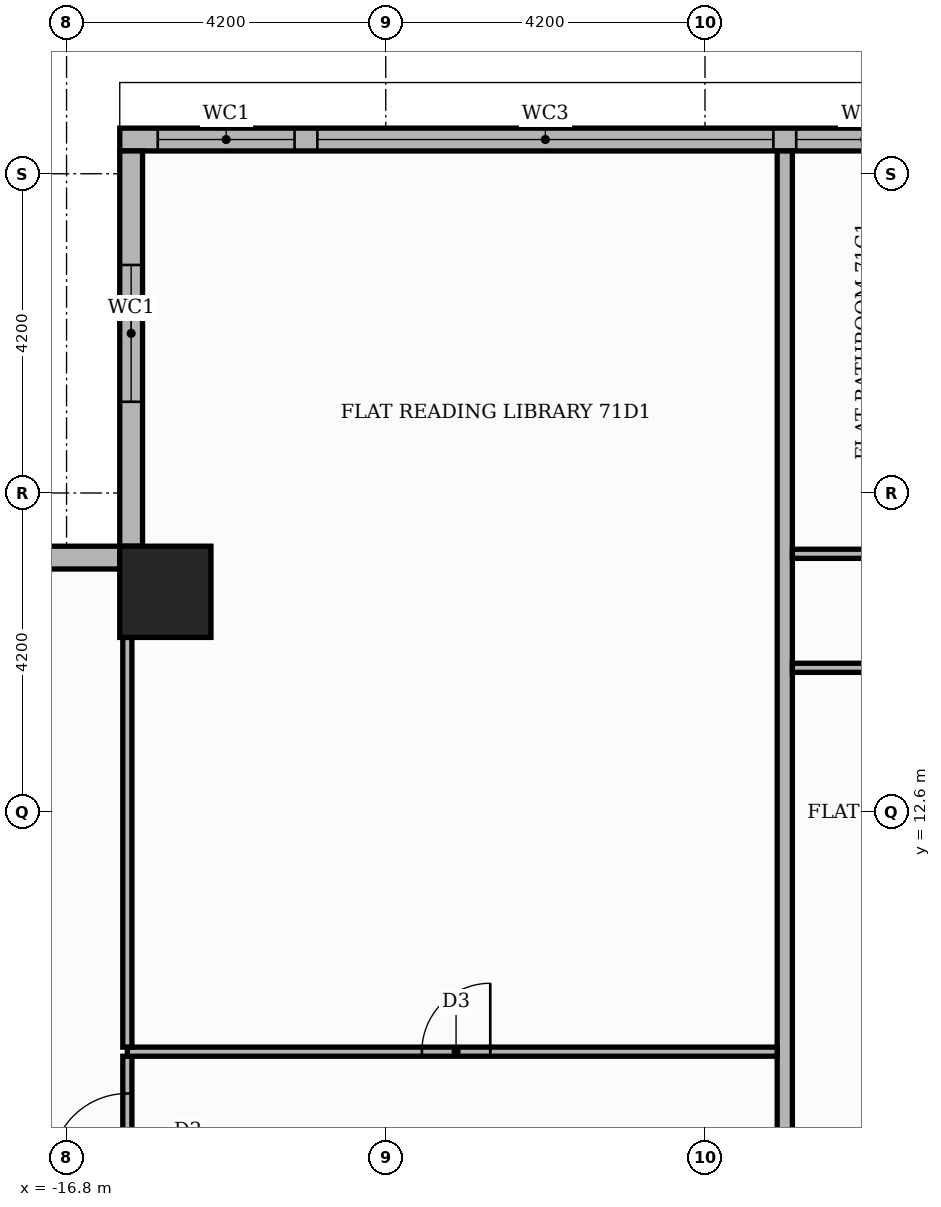
"""IFC4 building model, lengths in metres.
Left out: names, types, materials, properties, quantities, classifications, styles, units other than length and angle.
Written with IfcOpenShell. Run it as: python <this file> out.ifc"""

import sys

from ifc_helpers import new_model, si_unit, direction, frame, frame_2d, origin, origin_2d, place, context, subcontext, project, spatial, rectangle, extrude, element, fill, save


model = new_model("IFC4")
c1 = context("Model", 3, precision=1e-05, world=origin(), true_north=direction((0.0, 1.0)))
c2 = subcontext(c1, "Body", "Model", "MODEL_VIEW")
j1 = project(units=[si_unit("LENGTHUNIT", "METRE"), si_unit("PLANEANGLEUNIT", "RADIAN")], contexts=[c1])
p1 = place(None, origin())
s1 = spatial("IfcSite", under=j1, at=p1, CompositionType="ELEMENT")
p2 = place(p1, origin())
s2 = spatial("IfcBuilding", under=s1, at=p2, CompositionType="ELEMENT")
p3 = place(p2, frame((0.0, 0.0, 296.7)))
s3 = spatial("IfcBuildingStorey", under=s2, at=p3, CompositionType="ELEMENT", Elevation=296.7)
p4 = place(p3, frame((-15.5, 15.5, 0.0), z_axis=(0.0, 0.0, 1.0), x_axis=(1.0, 0.0, 0.0)))
e1 = element("IfcColumn", 1, at=p4, inside=s3, PredefinedType="COLUMN", context=c2, shape_type="SweptSolid", body=[
    extrude(rectangle(XDim=1.2, YDim=1.2, at=origin_2d()), origin(), (0.0, 0.0, 1.0), 3.9),
])
p5 = place(p3, frame((15.8, 21.45, 0.0), z_axis=(0.0, 0.0, 1.0), x_axis=(-1.0, 0.0, 0.0)))
e2 = element("IfcWall", 2, at=p5, inside=s3, PredefinedType="STANDARD", context=c2, shape_type="SweptSolid", body=[
    extrude(rectangle(XDim=31.9, YDim=0.3, at=frame_2d((15.95, 0.0))), origin(), (0.0, 0.0, 1.0), 3.55),
])
p6 = place(p5, frame((0.2, 0.0, 0.6)))
e3 = element("IfcOpeningElement", 3, at=p6, cuts=e2, PredefinedType="OPENING", context=c2, shape_type="SweptSolid", body=[
    extrude(rectangle(XDim=6.0, YDim=2.4, at=frame_2d((3.0, 1.2))), frame((0.0, 0.16, 0.0), z_axis=(0.0, -1.0, 0.0), x_axis=(1.0, 0.0, 0.0)), (0.0, 0.0, 1.0), 0.32),
])
p7 = place(p5, frame((6.5, 0.0, 0.6)))
e4 = element("IfcOpeningElement", 4, at=p7, cuts=e2, PredefinedType="OPENING", context=c2, shape_type="SweptSolid", body=[
    extrude(rectangle(XDim=3.9, YDim=2.4, at=frame_2d((1.95, 1.2))), frame((0.0, 0.16, 0.0), z_axis=(0.0, -1.0, 0.0), x_axis=(1.0, 0.0, 0.0)), (0.0, 0.0, 1.0), 0.32),
])
p8 = place(p5, frame((10.7, 0.0, 0.6)))
e5 = element("IfcOpeningElement", 5, at=p8, cuts=e2, PredefinedType="OPENING", context=c2, shape_type="SweptSolid", body=[
    extrude(rectangle(XDim=6.0, YDim=2.4, at=frame_2d((3.0, 1.2))), frame((0.0, 0.16, 0.0), z_axis=(0.0, -1.0, 0.0), x_axis=(1.0, 0.0, 0.0)), (0.0, 0.0, 1.0), 0.32),
])
p9 = place(p5, frame((17.0, 0.0, 0.6)))
e6 = element("IfcOpeningElement", 6, at=p9, cuts=e2, PredefinedType="OPENING", context=c2, shape_type="SweptSolid", body=[
    extrude(rectangle(XDim=1.8, YDim=2.4, at=frame_2d((0.9, 1.2))), frame((0.0, 0.16, 0.0), z_axis=(0.0, -1.0, 0.0), x_axis=(1.0, 0.0, 0.0)), (0.0, 0.0, 1.0), 0.32),
])
p10 = place(p5, frame((19.1, 0.0, 0.6)))
e7 = element("IfcOpeningElement", 7, at=p10, cuts=e2, PredefinedType="OPENING", context=c2, shape_type="SweptSolid", body=[
    extrude(rectangle(XDim=1.8, YDim=2.4, at=frame_2d((0.9, 1.2))), frame((0.0, 0.16, 0.0), z_axis=(0.0, -1.0, 0.0), x_axis=(1.0, 0.0, 0.0)), (0.0, 0.0, 1.0), 0.32),
])
p11 = place(p5, frame((21.2, 0.0, 0.6)))
e8 = element("IfcOpeningElement", 8, at=p11, cuts=e2, PredefinedType="OPENING", context=c2, shape_type="SweptSolid", body=[
    extrude(rectangle(XDim=1.8, YDim=2.4, at=frame_2d((0.9, 1.2))), frame((0.0, 0.16, 0.0), z_axis=(0.0, -1.0, 0.0), x_axis=(1.0, 0.0, 0.0)), (0.0, 0.0, 1.0), 0.32),
])
p12 = place(p5, frame((23.3, 0.0, 0.6)))
e9 = element("IfcOpeningElement", 9, at=p12, cuts=e2, PredefinedType="OPENING", context=c2, shape_type="SweptSolid", body=[
    extrude(rectangle(XDim=6.0, YDim=2.4, at=frame_2d((3.0, 1.2))), frame((0.0, 0.16, 0.0), z_axis=(0.0, -1.0, 0.0), x_axis=(1.0, 0.0, 0.0)), (0.0, 0.0, 1.0), 0.32),
])
p13 = place(p5, frame((29.6, 0.0, 0.6)))
e10 = element("IfcOpeningElement", 10, at=p13, cuts=e2, PredefinedType="OPENING", context=c2, shape_type="SweptSolid", body=[
    extrude(rectangle(XDim=1.8, YDim=2.4, at=frame_2d((0.9, 1.2))), frame((0.0, 0.16, 0.0), z_axis=(0.0, -1.0, 0.0), x_axis=(1.0, 0.0, 0.0)), (0.0, 0.0, 1.0), 0.32),
])
p14 = place(p3, frame((-15.95, 21.3, 0.0), z_axis=(0.0, 0.0, 1.0), x_axis=(0.0, -1.0, 0.0)))
e11 = element("IfcWall", 11, at=p14, inside=s3, PredefinedType="STANDARD", context=c2, shape_type="SweptSolid", body=[
    extrude(rectangle(XDim=5.2, YDim=0.3, at=frame_2d((2.6, 0.0))), origin(), (0.0, 0.0, 1.0), 3.55),
])
p15 = place(p14, frame((1.5, 0.0, 0.6)))
e12 = element("IfcOpeningElement", 12, at=p15, cuts=e11, PredefinedType="OPENING", context=c2, shape_type="SweptSolid", body=[
    extrude(rectangle(XDim=1.8, YDim=2.4, at=frame_2d((0.9, 1.2))), frame((0.0, 0.16, 0.0), z_axis=(0.0, -1.0, 0.0), x_axis=(1.0, 0.0, 0.0)), (0.0, 0.0, 1.0), 0.32),
])
p16 = place(p3, frame((-16.1, 15.95, 0.0), z_axis=(0.0, 0.0, 1.0), x_axis=(-1.0, 0.0, 0.0)))
e13 = element("IfcWall", 13, at=p16, inside=s3, PredefinedType="STANDARD", context=c2, shape_type="SweptSolid", body=[
    extrude(rectangle(XDim=5.5, YDim=0.3, at=frame_2d((2.75, 0.0))), origin(), (0.0, 0.0, 1.0), 3.55),
])
p17 = place(p16, frame((1.9, 0.0, 0.6)))
e14 = element("IfcOpeningElement", 14, at=p17, cuts=e13, PredefinedType="OPENING", context=c2, shape_type="SweptSolid", body=[
    extrude(rectangle(XDim=1.8, YDim=2.4, at=frame_2d((0.9, 1.2))), frame((0.0, 0.16, 0.0), z_axis=(0.0, -1.0, 0.0), x_axis=(1.0, 0.0, 0.0)), (0.0, 0.0, 1.0), 0.32),
])
p18 = place(p3, frame((-16.0, 7.41, 0.0), z_axis=(0.0, 0.0, 1.0), x_axis=(0.0, 1.0, 0.0)))
e15 = element("IfcWall", 15, at=p18, inside=s3, PredefinedType="PARTITIONING", context=c2, shape_type="SweptSolid", body=[
    extrude(rectangle(XDim=1.98, YDim=0.12, at=frame_2d((0.99, 0.0))), origin(), (0.0, 0.0, 1.0), 3.55),
])
p19 = place(p18, frame((0.49, 0.0, 0.0)))
e16 = element("IfcOpeningElement", 16, at=p19, cuts=e15, PredefinedType="OPENING", context=c2, shape_type="SweptSolid", body=[
    extrude(rectangle(XDim=1.0, YDim=2.1, at=frame_2d((0.5, 1.05))), frame((0.0, 0.07, 0.0), z_axis=(0.0, -1.0, 0.0), x_axis=(1.0, 0.0, 0.0)), (0.0, 0.0, 1.0), 0.14),
])
p20 = place(p3, frame((-7.35, 7.45, 0.0), z_axis=(0.0, 0.0, 1.0), x_axis=(0.0, 1.0, 0.0)))
e17 = element("IfcWall", 17, at=p20, inside=s3, PredefinedType="PARTITIONING", context=c2, shape_type="SweptSolid", body=[
    extrude(rectangle(XDim=13.85, YDim=0.2, at=frame_2d((6.925, 0.0))), origin(), (0.0, 0.0, 1.0), 3.55),
])
p21 = place(p3, frame((-16.0, 9.45, 0.0), z_axis=(0.0, 0.0, 1.0), x_axis=(1.0, 0.0, 0.0)))
e18 = element("IfcWall", 18, at=p21, inside=s3, PredefinedType="PARTITIONING", context=c2, shape_type="SweptSolid", body=[
    extrude(rectangle(XDim=8.55, YDim=0.12, at=frame_2d((4.275, 0.0))), origin(), (0.0, 0.0, 1.0), 3.55),
])
p22 = place(p21, frame((3.875, 0.0, 0.0)))
e19 = element("IfcOpeningElement", 19, at=p22, cuts=e18, PredefinedType="OPENING", context=c2, shape_type="SweptSolid", body=[
    extrude(rectangle(XDim=0.9, YDim=2.1, at=frame_2d((0.45, 1.05))), frame((0.0, 0.07, 0.0), z_axis=(0.0, -1.0, 0.0), x_axis=(1.0, 0.0, 0.0)), (0.0, 0.0, 1.0), 0.14),
])
p23 = place(p3, frame((-16.0, 9.51, 0.0), z_axis=(0.0, 0.0, 1.0), x_axis=(0.0, 1.0, 0.0)))
e20 = element("IfcWall", 20, at=p23, inside=s3, PredefinedType="PARTITIONING", context=c2, shape_type="SweptSolid", body=[
    extrude(rectangle(XDim=5.39, YDim=0.12, at=frame_2d((2.695, 0.0))), origin(), (0.0, 0.0, 1.0), 3.55),
])
p24 = place(p3, frame((-7.25, 14.5, 0.0), z_axis=(0.0, 0.0, 1.0), x_axis=(1.0, 0.0, 0.0)))
e21 = element("IfcWall", 21, at=p24, inside=s3, PredefinedType="PARTITIONING", context=c2, shape_type="SweptSolid", body=[
    extrude(rectangle(XDim=8.3, YDim=0.12, at=frame_2d((4.15, 0.0))), origin(), (0.0, 0.0, 1.0), 3.55),
])
p25 = place(p24, frame((4.475, 0.0, 0.0)))
e22 = element("IfcOpeningElement", 22, at=p25, cuts=e21, PredefinedType="OPENING", context=c2, shape_type="SweptSolid", body=[
    extrude(rectangle(XDim=0.9, YDim=2.1, at=frame_2d((0.45, 1.05))), frame((0.0, 0.07, 0.0), z_axis=(0.0, -1.0, 0.0), x_axis=(1.0, 0.0, 0.0)), (0.0, 0.0, 1.0), 0.14),
])
p26 = place(p24, frame((1.325, 0.0, 0.0)))
e23 = element("IfcOpeningElement", 23, at=p26, cuts=e21, PredefinedType="OPENING", context=c2, shape_type="SweptSolid", body=[
    extrude(rectangle(XDim=0.9, YDim=2.1, at=frame_2d((0.45, 1.05))), frame((0.0, 0.07, 0.0), z_axis=(0.0, -1.0, 0.0), x_axis=(1.0, 0.0, 0.0)), (0.0, 0.0, 1.0), 0.14),
])
p27 = place(p3, frame((-7.25, 16.0, 0.0), z_axis=(0.0, 0.0, 1.0), x_axis=(1.0, 0.0, 0.0)))
e24 = element("IfcWall", 24, at=p27, inside=s3, PredefinedType="PARTITIONING", context=c2, shape_type="SweptSolid", body=[
    extrude(rectangle(XDim=22.15, YDim=0.12, at=frame_2d((11.075, 0.0))), origin(), (0.0, 0.0, 1.0), 3.55),
])
p28 = place(p27, frame((13.05, 0.0, 0.0)))
e25 = element("IfcOpeningElement", 25, at=p28, cuts=e24, PredefinedType="OPENING", context=c2, shape_type="SweptSolid", body=[
    extrude(rectangle(XDim=1.0, YDim=2.1, at=frame_2d((0.5, 1.05))), frame((0.0, 0.07, 0.0), z_axis=(0.0, -1.0, 0.0), x_axis=(1.0, 0.0, 0.0)), (0.0, 0.0, 1.0), 0.14),
])
p29 = place(p27, frame((7.85, 0.0, 0.0)))
e26 = element("IfcOpeningElement", 26, at=p29, cuts=e24, PredefinedType="OPENING", context=c2, shape_type="SweptSolid", body=[
    extrude(rectangle(XDim=0.9, YDim=2.1, at=frame_2d((0.45, 1.05))), frame((0.0, 0.07, 0.0), z_axis=(0.0, -1.0, 0.0), x_axis=(1.0, 0.0, 0.0)), (0.0, 0.0, 1.0), 0.14),
])
p30 = place(p11, origin())
e27 = element("IfcWindow", 27, at=p30, inside=s3, PartitioningType="SINGLE_PANEL", PredefinedType="WINDOW", context=c2, shape_type="SweptSolid", body=[
    extrude(rectangle(XDim=1.8, YDim=2.4, at=frame_2d((0.9, 1.2))), frame((0.0, 0.03, 0.0), z_axis=(0.0, -1.0, 0.0), x_axis=(1.0, 0.0, 0.0)), (0.0, 0.0, 1.0), 0.06),
])
fill(e8, e27)
p31 = place(p12, origin())
e28 = element("IfcWindow", 28, at=p31, inside=s3, PartitioningType="SINGLE_PANEL", PredefinedType="WINDOW", context=c2, shape_type="SweptSolid", body=[
    extrude(rectangle(XDim=6.0, YDim=2.4, at=frame_2d((3.0, 1.2))), frame((0.0, 0.03, 0.0), z_axis=(0.0, -1.0, 0.0), x_axis=(1.0, 0.0, 0.0)), (0.0, 0.0, 1.0), 0.06),
])
fill(e9, e28)
p32 = place(p13, origin())
e29 = element("IfcWindow", 29, at=p32, inside=s3, PartitioningType="SINGLE_PANEL", PredefinedType="WINDOW", context=c2, shape_type="SweptSolid", body=[
    extrude(rectangle(XDim=1.8, YDim=2.4, at=frame_2d((0.9, 1.2))), frame((0.0, 0.03, 0.0), z_axis=(0.0, -1.0, 0.0), x_axis=(1.0, 0.0, 0.0)), (0.0, 0.0, 1.0), 0.06),
])
fill(e10, e29)
p33 = place(p15, origin())
e30 = element("IfcWindow", 30, at=p33, inside=s3, PartitioningType="SINGLE_PANEL", PredefinedType="WINDOW", context=c2, shape_type="SweptSolid", body=[
    extrude(rectangle(XDim=1.8, YDim=2.4, at=frame_2d((0.9, 1.2))), frame((0.0, 0.03, 0.0), z_axis=(0.0, -1.0, 0.0), x_axis=(1.0, 0.0, 0.0)), (0.0, 0.0, 1.0), 0.06),
])
fill(e12, e30)
p34 = place(p22, origin())
e31 = element("IfcDoor", 31, at=p34, inside=s3, OperationType="SINGLE_SWING_RIGHT", PredefinedType="DOOR", context=c2, shape_type="SweptSolid", body=[
    extrude(rectangle(XDim=0.9, YDim=2.1, at=frame_2d((0.45, 1.05))), frame((0.0, 0.025, 0.0), z_axis=(0.0, -1.0, 0.0), x_axis=(1.0, 0.0, 0.0)), (0.0, 0.0, 1.0), 0.05),
])
fill(e19, e31)
p35 = place(p19, origin())
e32 = element("IfcDoor", 32, at=p35, inside=s3, OperationType="SINGLE_SWING_LEFT", PredefinedType="DOOR", context=c2, shape_type="SweptSolid", body=[
    extrude(rectangle(XDim=1.0, YDim=2.1, at=frame_2d((0.5, 1.05))), frame((0.0, 0.025, 0.0), z_axis=(0.0, -1.0, 0.0), x_axis=(1.0, 0.0, 0.0)), (0.0, 0.0, 1.0), 0.05),
])
fill(e16, e32)
save(model, sys.argv[1])
